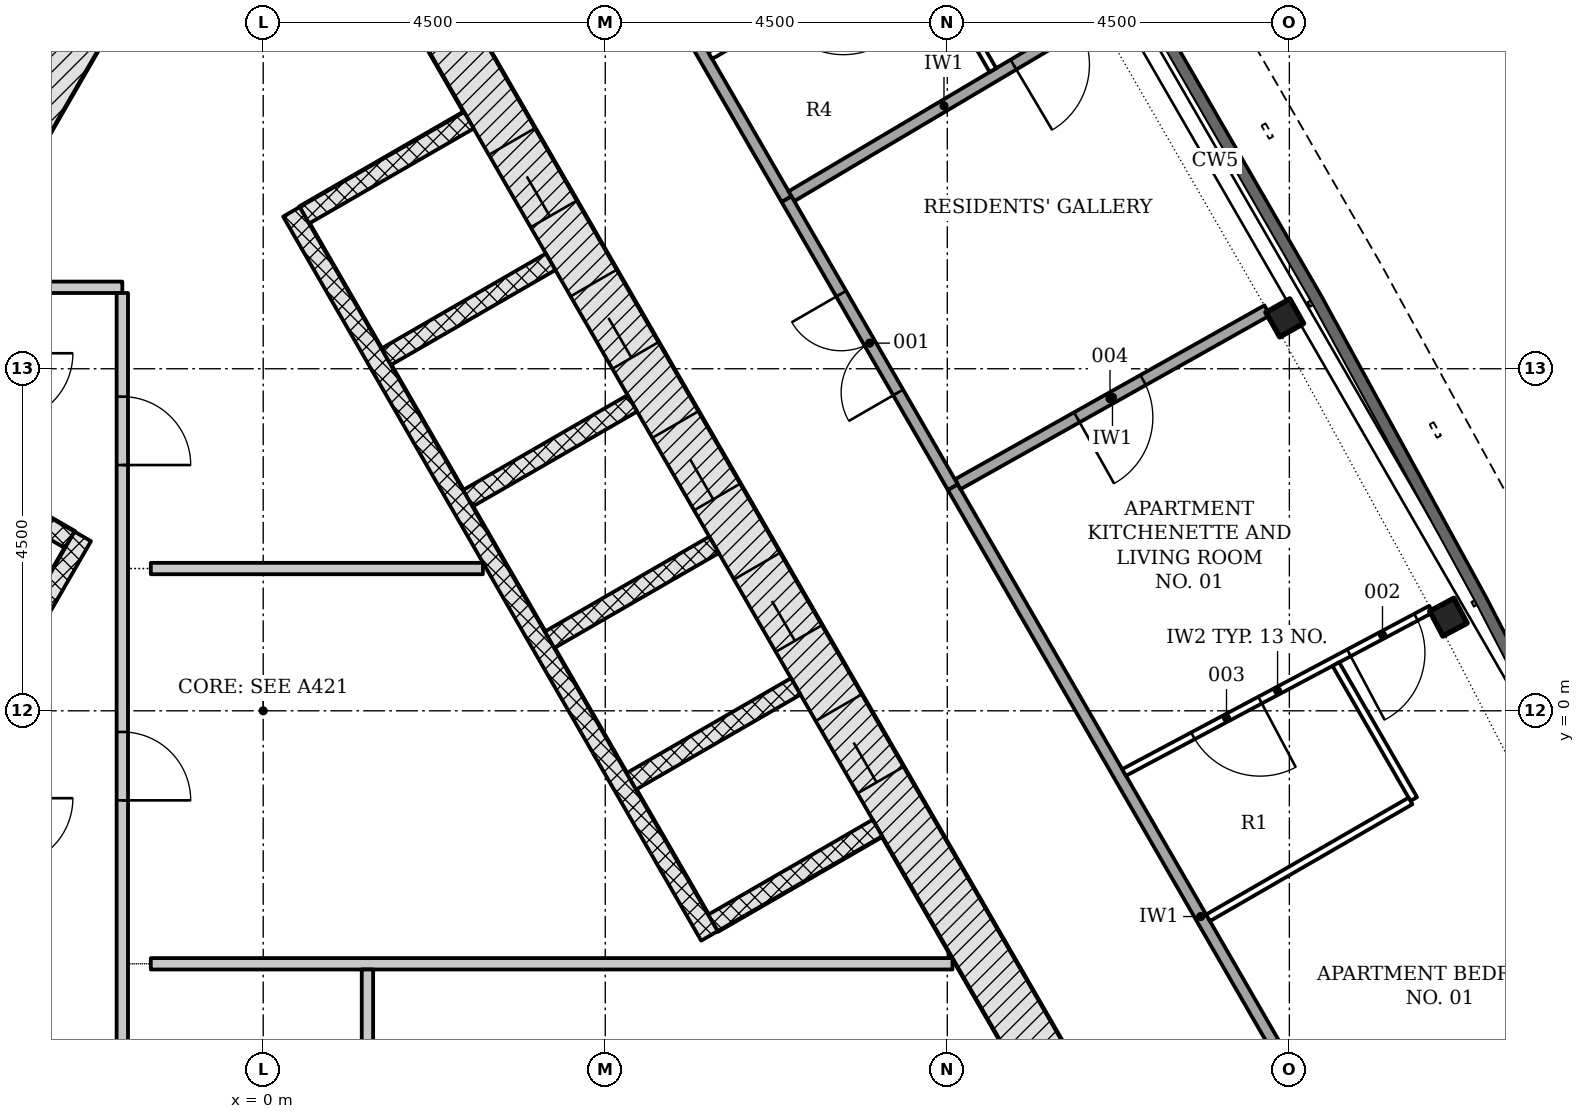
"""IFC4 building model, lengths in metres.
Left out: names, types, materials, properties, quantities, classifications, styles, units other than length and angle.
Written with IfcOpenShell. Run it as: python <this file> out.ifc"""

import sys

from ifc_helpers import new_model, si_unit, direction, frame, frame_2d, origin, origin_2d, place, context, subcontext, project, spatial, polyline, rectangle, i_section, outline, extrude, element, fill, save


model = new_model("IFC4")
c1 = context("Model", 3, precision=1e-05, world=origin(), true_north=direction((0.0, 1.0)))
c2 = subcontext(c1, "Body", "Model", "MODEL_VIEW")
j1 = project(units=[si_unit("LENGTHUNIT", "METRE"), si_unit("PLANEANGLEUNIT", "RADIAN")], contexts=[c1])
p1 = place(None, origin())
s1 = spatial("IfcSite", under=j1, at=p1, CompositionType="ELEMENT")
p2 = place(p1, origin())
s2 = spatial("IfcBuilding", under=s1, at=p2, CompositionType="ELEMENT")
p3 = place(p2, frame((0.0, 0.0, 263.4)))
s3 = spatial("IfcBuildingStorey", under=s2, at=p3, CompositionType="ELEMENT", Elevation=263.4)
p4 = place(p3, frame((8.926, -6.753, -0.2), z_axis=(0.0, 0.0, 1.0), x_axis=(0.500042739161, 0.866000726912, 0.0)))
e1 = element("IfcWall", 1, at=p4, inside=s3, PredefinedType="SHEAR", context=c2, shape_type="SweptSolid", body=[
    extrude(rectangle(XDim=2.771, YDim=0.7, at=frame_2d((1.386, 0.0))), origin(), (0.0, 0.0, 1.0), 3.6),
])
p5 = place(p3, frame((10.311, -4.703, -0.2), z_axis=(0.0, 0.0, 1.0), x_axis=(-0.500001446645, 0.866024568562, 0.0)))
e2 = element("IfcWall", 2, at=p5, inside=s3, PredefinedType="SHEAR", context=c2, shape_type="SweptSolid", body=[
    extrude(rectangle(XDim=18.458, YDim=0.7, at=frame_2d((9.229, 0.0))), origin(), (0.0, 0.0, 1.0), 3.6),
])
p6 = place(p5, frame((4.379, 0.0, 0.2)))
e3 = element("IfcOpeningElement", 3, at=p6, cuts=e2, PredefinedType="OPENING", context=c2, shape_type="SweptSolid", body=[
    extrude(rectangle(XDim=1.1, YDim=2.1, at=frame_2d((0.55, 1.05))), frame((0.0, 0.36, 0.0), z_axis=(0.0, -1.0, 0.0), x_axis=(1.0, 0.0, 0.0)), (0.0, 0.0, 1.0), 0.72),
])
p7 = place(p5, frame((6.529, 0.0, 0.2)))
e4 = element("IfcOpeningElement", 4, at=p7, cuts=e2, PredefinedType="OPENING", context=c2, shape_type="SweptSolid", body=[
    extrude(rectangle(XDim=1.1, YDim=2.1, at=frame_2d((0.55, 1.05))), frame((0.0, 0.36, 0.0), z_axis=(0.0, -1.0, 0.0), x_axis=(1.0, 0.0, 0.0)), (0.0, 0.0, 1.0), 0.72),
])
p8 = place(p5, frame((8.679, 0.0, 0.2)))
e5 = element("IfcOpeningElement", 5, at=p8, cuts=e2, PredefinedType="OPENING", context=c2, shape_type="SweptSolid", body=[
    extrude(rectangle(XDim=1.1, YDim=2.1, at=frame_2d((0.55, 1.05))), frame((0.0, 0.36, 0.0), z_axis=(0.0, -1.0, 0.0), x_axis=(1.0, 0.0, 0.0)), (0.0, 0.0, 1.0), 0.72),
])
p9 = place(p5, frame((10.829, 0.0, 0.2)))
e6 = element("IfcOpeningElement", 6, at=p9, cuts=e2, PredefinedType="OPENING", context=c2, shape_type="SweptSolid", body=[
    extrude(rectangle(XDim=1.1, YDim=2.1, at=frame_2d((0.55, 1.05))), frame((0.0, 0.36, 0.0), z_axis=(0.0, -1.0, 0.0), x_axis=(1.0, 0.0, 0.0)), (0.0, 0.0, 1.0), 0.72),
])
p10 = place(p5, frame((12.979, 0.0, 0.2)))
e7 = element("IfcOpeningElement", 7, at=p10, cuts=e2, PredefinedType="OPENING", context=c2, shape_type="SweptSolid", body=[
    extrude(rectangle(XDim=1.1, YDim=2.1, at=frame_2d((0.55, 1.05))), frame((0.0, 0.36, 0.0), z_axis=(0.0, -1.0, 0.0), x_axis=(1.0, 0.0, 0.0)), (0.0, 0.0, 1.0), 0.72),
])
p11 = place(p3, frame((-1.083, 11.281, -0.2), z_axis=(0.0, 0.0, 1.0), x_axis=(-0.500001446645, -0.866024568562, 0.0)))
e8 = element("IfcWall", 8, at=p11, inside=s3, PredefinedType="SHEAR", context=c2, shape_type="SweptSolid", body=[
    extrude(rectangle(XDim=18.458, YDim=0.7, at=frame_2d((9.229, 0.0))), origin(), (0.0, 0.0, 1.0), 3.6),
])
p12 = place(p11, frame((8.979, 0.0, 0.2)))
e9 = element("IfcOpeningElement", 9, at=p12, cuts=e8, PredefinedType="OPENING", context=c2, shape_type="SweptSolid", body=[
    extrude(rectangle(XDim=1.2, YDim=2.1, at=frame_2d((0.6, 1.05))), frame((0.0, 0.36, 0.0), z_axis=(0.0, -1.0, 0.0), x_axis=(1.0, 0.0, 0.0)), (0.0, 0.0, 1.0), 0.72),
])
p13 = place(p11, frame((11.029, 0.0, 0.2)))
e10 = element("IfcOpeningElement", 10, at=p13, cuts=e8, PredefinedType="OPENING", context=c2, shape_type="SweptSolid", body=[
    extrude(rectangle(XDim=1.2, YDim=2.1, at=frame_2d((0.6, 1.05))), frame((0.0, 0.36, 0.0), z_axis=(0.0, -1.0, 0.0), x_axis=(1.0, 0.0, 0.0)), (0.0, 0.0, 1.0), 0.72),
])
for number, where, z_axis, x_axis in (
    (11, (15.593, 1.232, -0.2), (0.0, 0.0, 1.0), (-0.47, 0.883, 0.0)),
    (12, (13.44, 5.169, -0.2), (0.0, 0.0, 1.0), (-0.49, 0.872, 0.0)),
):
    element("IfcColumn", number, at=place(p3, frame(where, z_axis=z_axis, x_axis=x_axis)), inside=s3, PredefinedType="COLUMN", context=c2, shape_type="SweptSolid", body=[
        extrude(i_section(OverallWidth=0.371, OverallDepth=0.361, WebThickness=0.012, FlangeThickness=0.02, FilletRadius=0.015, at=origin_2d()), origin(), (0.0, 0.0, 1.0), 3.6),
    ])
p14 = place(p3, origin())
e13 = element("IfcWall", 13, at=p14, inside=s3, PredefinedType="NOTDEFINED", context=c2, shape_type="SweptSolid", body=[
    extrude(outline(polyline([(11.244, -14.46), (13.211, -14.336), (14.708, -14.069), (16.111, -13.485), (17.355, -12.611), (18.381, -11.49), (19.141, -10.174), (19.599, -8.724), (19.733, -7.21), (19.538, -5.703), (19.021, -4.273), (18.145, -2.507), (17.876, -2.64), (18.745, -4.391), (19.244, -5.774), (19.432, -7.216), (19.303, -8.665), (18.865, -10.052), (18.138, -11.312), (17.156, -12.385), (15.965, -13.22), (14.623, -13.779), (13.176, -14.038), (11.225, -14.161), (11.244, -14.46)])), origin(), (0.0, 0.0, 1.0), 3.3),
])
for number, where, z_axis, x_axis in (
    (14, (8.081, -1.541, -0.2), (0.0, 0.0, 1.0), (-0.866, -0.5, 0.0)),
    (15, (7.006, 0.321, -0.2), (0.0, 0.0, 1.0), (-0.866, -0.5, 0.0)),
):
    element("IfcWall", number, at=place(p3, frame(where, z_axis=z_axis, x_axis=x_axis)), inside=s3, PredefinedType="PARTITIONING", context=c2, shape_type="SweptSolid", body=[
        extrude(rectangle(XDim=2.5, YDim=0.25, at=frame_2d((1.25, 0.0))), origin(), (0.0, 0.0, 1.0), 3.6),
    ])
p15 = place(p3, frame((5.931, 2.183, -0.2), z_axis=(0.0, 0.0, 1.0), x_axis=(-0.866047370643, -0.499961950354, 0.0)))
e16 = element("IfcWall", 16, at=p15, inside=s3, PredefinedType="PARTITIONING", context=c2, shape_type="SweptSolid", body=[
    extrude(rectangle(XDim=2.5, YDim=0.25, at=frame_2d((1.25, 0.0))), origin(), (0.0, 0.0, 1.0), 3.6),
])
for number, where, z_axis, x_axis in (
    (17, (4.856, 4.045, -0.2), (0.0, 0.0, 1.0), (-0.866, -0.5, 0.0)),
    (18, (3.781, 5.907, -0.2), (0.0, 0.0, 1.0), (-0.866, -0.5, 0.0)),
    (19, (2.706, 7.769, -0.2), (0.0, 0.0, 1.0), (-0.866, -0.5, 0.0)),
):
    element("IfcWall", number, at=place(p3, frame(where, z_axis=z_axis, x_axis=x_axis)), inside=s3, PredefinedType="PARTITIONING", context=c2, shape_type="SweptSolid", body=[
        extrude(rectangle(XDim=2.5, YDim=0.25, at=frame_2d((1.25, 0.0))), origin(), (0.0, 0.0, 1.0), 3.6),
    ])
p16 = place(p3, frame((5.87, -2.961, 0.0), z_axis=(0.0, 0.0, 1.0), x_axis=(-0.50000615651, 0.866021849293, 0.0)))
e20 = element("IfcWall", 20, at=p16, inside=s3, PredefinedType="PARTITIONING", context=c2, shape_type="SweptSolid", body=[
    extrude(rectangle(XDim=11.0, YDim=0.25, at=frame_2d((5.5, 0.0))), origin(), (0.0, 0.0, 1.0), 3.4),
])
p17 = place(p3, frame((-5.056, 3.699, -0.2), z_axis=(0.0, 0.0, 1.0), x_axis=(0.866032775405, -0.499987231761, 0.0)))
e21 = element("IfcWall", 21, at=p17, inside=s3, PredefinedType="PARTITIONING", context=c2, shape_type="SweptSolid", body=[
    extrude(rectangle(XDim=2.9, YDim=0.25, at=frame_2d((1.45, 0.0))), origin(), (0.0, 0.0, 1.0), 3.6),
])
p18 = place(p3, frame((-2.374, 2.294, 0.0), z_axis=(0.0, 0.0, 1.0), x_axis=(-0.500003174267, -0.866023571113, 0.0)))
e22 = element("IfcWall", 22, at=p18, inside=s3, PredefinedType="PARTITIONING", context=c2, shape_type="SweptSolid", body=[
    extrude(rectangle(XDim=6.7, YDim=0.25, at=frame_2d((3.35, 0.0))), origin(), (0.0, 0.0, 1.0), 3.4),
])
p19 = place(p3, frame((-3.329, 5.572, 0.0), z_axis=(0.0, 0.0, 1.0), x_axis=(1.0, 0.0, 0.0)))
e23 = element("IfcWall", 23, at=p19, inside=s3, PredefinedType="PARTITIONING", context=c2, shape_type="SweptSolid", body=[
    extrude(rectangle(XDim=1.475, YDim=0.15, at=frame_2d((0.737, 0.0))), origin(), (0.0, 0.0, 1.0), 3.4),
])
p20 = place(p3, frame((-1.854, 5.497, 0.0), z_axis=(0.0, 0.0, 1.0), x_axis=(0.0, -1.0, 0.0)))
e24 = element("IfcWall", 24, at=p20, inside=s3, PredefinedType="PARTITIONING", context=c2, shape_type="SweptSolid", body=[
    extrude(rectangle(XDim=11.725, YDim=0.15, at=frame_2d((5.863, 0.0))), origin(), (0.0, 0.0, 1.0), 3.4),
])
p21 = place(p20, frame((5.775, 0.0, 0.0)))
e25 = element("IfcOpeningElement", 25, at=p21, cuts=e24, PredefinedType="OPENING", context=c2, shape_type="SweptSolid", body=[
    extrude(rectangle(XDim=0.9, YDim=2.1, at=frame_2d((0.45, 1.05))), frame((0.0, 0.085, 0.0), z_axis=(0.0, -1.0, 0.0), x_axis=(1.0, 0.0, 0.0)), (0.0, 0.0, 1.0), 0.17),
])
p22 = place(p20, frame((1.364, 0.0, 0.0)))
e26 = element("IfcOpeningElement", 26, at=p22, cuts=e24, PredefinedType="OPENING", context=c2, shape_type="SweptSolid", body=[
    extrude(rectangle(XDim=0.9, YDim=2.1, at=frame_2d((0.45, 1.05))), frame((0.0, 0.085, 0.0), z_axis=(0.0, -1.0, 0.0), x_axis=(1.0, 0.0, 0.0)), (0.0, 0.0, 1.0), 0.17),
])
p23 = place(p3, frame((-1.479, -3.328, 0.0), z_axis=(0.0, 0.0, 1.0), x_axis=(1.0, 0.0, 0.0)))
e27 = element("IfcWall", 27, at=p23, inside=s3, PredefinedType="PARTITIONING", context=c2, shape_type="SweptSolid", body=[
    extrude(rectangle(XDim=10.547, YDim=0.15, at=frame_2d((5.273, 0.0))), origin(), (0.0, 0.0, 1.0), 3.4),
])
p24 = place(p3, frame((-1.479, 1.872, 0.0), z_axis=(0.0, 0.0, 1.0), x_axis=(1.0, 0.0, 0.0)))
e28 = element("IfcWall", 28, at=p24, inside=s3, PredefinedType="PARTITIONING", context=c2, shape_type="SweptSolid", body=[
    extrude(rectangle(XDim=4.369, YDim=0.15, at=frame_2d((2.185, 0.0))), origin(), (0.0, 0.0, 1.0), 3.4),
])
p25 = place(p3, frame((1.371, -3.403, 0.0), z_axis=(0.0, 0.0, 1.0), x_axis=(0.0, -1.0, 0.0)))
e29 = element("IfcWall", 29, at=p25, inside=s3, PredefinedType="PARTITIONING", context=c2, shape_type="SweptSolid", body=[
    extrude(rectangle(XDim=2.825, YDim=0.15, at=frame_2d((1.413, 0.0))), origin(), (0.0, 0.0, 1.0), 3.4),
])
p26 = place(p3, frame((15.596, -8.357, 0.0), z_axis=(0.0, 0.0, 1.0), x_axis=(-0.500010741103, 0.866019202317, 0.0)))
e30 = element("IfcWall", 30, at=p26, inside=s3, PredefinedType="PARTITIONING", context=c2, shape_type="SweptSolid", body=[
    extrude(rectangle(XDim=13.049, YDim=0.15, at=frame_2d((6.524, 0.0))), origin(), (0.0, 0.0, 1.0), 2.852),
])
p27 = place(p3, frame((6.885, 6.731, 0.0), z_axis=(0.0, 0.0, 1.0), x_axis=(-0.500003399299, 0.866023441189, 0.0)))
e31 = element("IfcWall", 31, at=p27, inside=s3, PredefinedType="PARTITIONING", context=c2, shape_type="SweptSolid", body=[
    extrude(rectangle(XDim=5.341, YDim=0.15, at=frame_2d((2.67, 0.0))), origin(), (0.0, 0.0, 1.0), 2.852),
])
p28 = place(p3, frame((13.209, 5.269, 0.0), z_axis=(0.0, 0.0, 1.0), x_axis=(-0.871762529681, -0.489928659953, 0.0)))
e32 = element("IfcWall", 32, at=p28, inside=s3, PredefinedType="PARTITIONING", context=c2, shape_type="SweptSolid", body=[
    extrude(rectangle(XDim=4.671, YDim=0.15, at=frame_2d((2.335, 0.0))), origin(), (0.0, 0.0, 1.0), 3.4),
])
p29 = place(p28, frame((1.873, 0.0, 0.0)))
e33 = element("IfcOpeningElement", 33, at=p29, cuts=e32, PredefinedType="OPENING", context=c2, shape_type="SweptSolid", body=[
    extrude(rectangle(XDim=1.0, YDim=2.1, at=frame_2d((0.5, 1.05))), frame((0.0, 0.085, 0.0), z_axis=(0.0, -1.0, 0.0), x_axis=(1.0, 0.0, 0.0)), (0.0, 0.0, 1.0), 0.17),
])
p30 = place(p3, frame((10.963, 9.149, 0.0), z_axis=(0.0, 0.0, 1.0), x_axis=(-0.860158922337, -0.510026105532, 0.0)))
e34 = element("IfcWall", 34, at=p30, inside=s3, PredefinedType="PARTITIONING", context=c2, shape_type="SweptSolid", body=[
    extrude(rectangle(XDim=4.666, YDim=0.15, at=frame_2d((2.333, 0.0))), origin(), (0.0, 0.0, 1.0), 3.4),
])
p31 = place(p30, frame((0.27, 0.0, 0.0)))
e35 = element("IfcOpeningElement", 35, at=p31, cuts=e34, PredefinedType="OPENING", context=c2, shape_type="SweptSolid", body=[
    extrude(rectangle(XDim=1.0, YDim=2.1, at=frame_2d((0.5, 1.05))), frame((0.0, 0.085, 0.0), z_axis=(0.0, -1.0, 0.0), x_axis=(1.0, 0.0, 0.0)), (0.0, 0.0, 1.0), 0.17),
])
p32 = place(p3, frame((9.072, 2.944, 0.0), z_axis=(0.0, 0.0, 1.0), x_axis=(-0.499999494409, 0.866025695687, 0.0)))
e36 = element("IfcWall", 36, at=p32, inside=s3, PredefinedType="PARTITIONING", context=c2, shape_type="SweptSolid", body=[
    extrude(rectangle(XDim=4.374, YDim=0.15, at=frame_2d((2.187, 0.0))), origin(), (0.0, 0.0, 1.0), 2.852),
])
p33 = place(p32, frame((1.437, 0.0, 0.0)))
e37 = element("IfcOpeningElement", 37, at=p33, cuts=e36, PredefinedType="OPENING", context=c2, shape_type="SweptSolid", body=[
    extrude(rectangle(XDim=1.5, YDim=2.1, at=frame_2d((0.75, 1.05))), frame((0.0, 0.085, 0.0), z_axis=(0.0, -1.0, 0.0), x_axis=(1.0, 0.0, 0.0)), (0.0, 0.0, 1.0), 0.17),
])
p34 = place(p3, frame((15.364, 1.337, 0.0), z_axis=(0.0, 0.0, 1.0), x_axis=(-0.882891694615, -0.469576676997, 0.0)))
e38 = element("IfcWall", 38, at=p34, inside=s3, PredefinedType="PARTITIONING", context=c2, shape_type="SweptSolid", body=[
    extrude(rectangle(XDim=4.574, YDim=0.1, at=frame_2d((2.287, 0.0))), origin(), (0.0, 0.0, 1.0), 3.4),
])
p35 = place(p34, frame((0.223, 0.0, 0.0)))
e39 = element("IfcOpeningElement", 39, at=p35, cuts=e38, PredefinedType="OPENING", context=c2, shape_type="SweptSolid", body=[
    extrude(rectangle(XDim=1.0, YDim=2.1, at=frame_2d((0.5, 1.05))), frame((0.0, 0.06, 0.0), z_axis=(0.0, -1.0, 0.0), x_axis=(1.0, 0.0, 0.0)), (0.0, 0.0, 1.0), 0.12),
])
p36 = place(p34, frame((2.548, 0.0, 0.0)))
e40 = element("IfcOpeningElement", 40, at=p36, cuts=e38, PredefinedType="OPENING", context=c2, shape_type="SweptSolid", body=[
    extrude(rectangle(XDim=1.0, YDim=2.1, at=frame_2d((0.5, 1.05))), frame((0.0, 0.06, 0.0), z_axis=(0.0, -1.0, 0.0), x_axis=(1.0, 0.0, 0.0)), (0.0, 0.0, 1.0), 0.12),
])
p37 = place(p3, frame((14.112, 0.614, 0.0), z_axis=(0.0, 0.0, 1.0), x_axis=(0.500007699544, -0.866020958405, 0.0)))
e41 = element("IfcWall", 41, at=p37, inside=s3, PredefinedType="PARTITIONING", context=c2, shape_type="SweptSolid", body=[
    extrude(rectangle(XDim=2.05, YDim=0.1, at=frame_2d((1.025, 0.0))), origin(), (0.0, 0.0, 1.0), 2.852),
])
p38 = place(p3, frame((15.094, -1.186, 0.0), z_axis=(0.0, 0.0, 1.0), x_axis=(-0.866050731258, -0.499956128963, 0.0)))
e42 = element("IfcWall", 42, at=p38, inside=s3, PredefinedType="PARTITIONING", context=c2, shape_type="SweptSolid", body=[
    extrude(rectangle(XDim=3.075, YDim=0.1, at=frame_2d((1.538, 0.0))), origin(), (0.0, 0.0, 1.0), 3.4),
])
p39 = place(p3, frame((9.6, 8.428, 0.0), z_axis=(0.0, 0.0, 1.0), x_axis=(-0.499990325971, 0.866030989016, 0.0)))
e43 = element("IfcWall", 43, at=p39, inside=s3, PredefinedType="PARTITIONING", context=c2, shape_type="SweptSolid", body=[
    extrude(rectangle(XDim=2.025, YDim=0.1, at=frame_2d((1.012, 0.0))), origin(), (0.0, 0.0, 1.0), 3.4),
])
p40 = place(p3, frame((8.544, 10.157, 0.0), z_axis=(0.0, 0.0, 1.0), x_axis=(-0.866016353143, -0.500015675843, 0.0)))
e44 = element("IfcWall", 44, at=p40, inside=s3, PredefinedType="PARTITIONING", context=c2, shape_type="SweptSolid", body=[
    extrude(rectangle(XDim=3.075, YDim=0.1, at=frame_2d((1.538, 0.0))), origin(), (0.0, 0.0, 1.0), 3.4),
])
p41 = place(p40, frame((1.05, 0.0, 0.0)))
e45 = element("IfcOpeningElement", 45, at=p41, cuts=e44, PredefinedType="OPENING", context=c2, shape_type="SweptSolid", body=[
    extrude(rectangle(XDim=1.0, YDim=2.1, at=frame_2d((0.5, 1.05))), frame((0.0, 0.06, 0.0), z_axis=(0.0, -1.0, 0.0), x_axis=(1.0, 0.0, 0.0)), (0.0, 0.0, 1.0), 0.12),
])
p42 = place(p6, origin())
e46 = element("IfcDoor", 46, at=p42, inside=s3, OperationType="DOUBLE_DOOR_SLIDING", PredefinedType="DOOR", context=c2, shape_type="SweptSolid", body=[
    extrude(rectangle(XDim=1.1, YDim=2.1, at=frame_2d((0.55, 1.05))), frame((0.0, 0.025, 0.0), z_axis=(0.0, -1.0, 0.0), x_axis=(1.0, 0.0, 0.0)), (0.0, 0.0, 1.0), 0.05),
])
fill(e3, e46)
p43 = place(p7, origin())
e47 = element("IfcDoor", 47, at=p43, inside=s3, OperationType="DOUBLE_DOOR_SLIDING", PredefinedType="DOOR", context=c2, shape_type="SweptSolid", body=[
    extrude(rectangle(XDim=1.1, YDim=2.1, at=frame_2d((0.55, 1.05))), frame((0.0, 0.025, 0.0), z_axis=(0.0, -1.0, 0.0), x_axis=(1.0, 0.0, 0.0)), (0.0, 0.0, 1.0), 0.05),
])
fill(e4, e47)
p44 = place(p8, origin())
e48 = element("IfcDoor", 48, at=p44, inside=s3, OperationType="DOUBLE_DOOR_SLIDING", PredefinedType="DOOR", context=c2, shape_type="SweptSolid", body=[
    extrude(rectangle(XDim=1.1, YDim=2.1, at=frame_2d((0.55, 1.05))), frame((0.0, 0.025, 0.0), z_axis=(0.0, -1.0, 0.0), x_axis=(1.0, 0.0, 0.0)), (0.0, 0.0, 1.0), 0.05),
])
fill(e5, e48)
p45 = place(p9, origin())
e49 = element("IfcDoor", 49, at=p45, inside=s3, OperationType="DOUBLE_DOOR_SLIDING", PredefinedType="DOOR", context=c2, shape_type="SweptSolid", body=[
    extrude(rectangle(XDim=1.1, YDim=2.1, at=frame_2d((0.55, 1.05))), frame((0.0, 0.025, 0.0), z_axis=(0.0, -1.0, 0.0), x_axis=(1.0, 0.0, 0.0)), (0.0, 0.0, 1.0), 0.05),
])
fill(e6, e49)
p46 = place(p10, origin())
e50 = element("IfcDoor", 50, at=p46, inside=s3, OperationType="DOUBLE_DOOR_SLIDING", PredefinedType="DOOR", context=c2, shape_type="SweptSolid", body=[
    extrude(rectangle(XDim=1.1, YDim=2.1, at=frame_2d((0.55, 1.05))), frame((0.0, 0.025, 0.0), z_axis=(0.0, -1.0, 0.0), x_axis=(1.0, 0.0, 0.0)), (0.0, 0.0, 1.0), 0.05),
])
fill(e7, e50)
p47 = place(p21, origin())
e51 = element("IfcDoor", 51, at=p47, inside=s3, OperationType="SINGLE_SWING_RIGHT", PredefinedType="DOOR", context=c2, shape_type="SweptSolid", body=[
    extrude(rectangle(XDim=0.9, YDim=2.1, at=frame_2d((0.45, 1.05))), frame((0.0, 0.025, 0.0), z_axis=(0.0, -1.0, 0.0), x_axis=(1.0, 0.0, 0.0)), (0.0, 0.0, 1.0), 0.05),
])
fill(e25, e51)
p48 = place(p22, origin())
e52 = element("IfcDoor", 52, at=p48, inside=s3, OperationType="SINGLE_SWING_RIGHT", PredefinedType="DOOR", context=c2, shape_type="SweptSolid", body=[
    extrude(rectangle(XDim=0.9, YDim=2.1, at=frame_2d((0.45, 1.05))), frame((0.0, 0.025, 0.0), z_axis=(0.0, -1.0, 0.0), x_axis=(1.0, 0.0, 0.0)), (0.0, 0.0, 1.0), 0.05),
])
fill(e26, e52)
p49 = place(p33, origin())
e53 = element("IfcDoor", 53, at=p49, inside=s3, OperationType="DOUBLE_DOOR_SINGLE_SWING", PredefinedType="DOOR", context=c2, shape_type="SweptSolid", body=[
    extrude(rectangle(XDim=1.5, YDim=2.1, at=frame_2d((0.75, 1.05))), frame((0.0, 0.025, 0.0), z_axis=(0.0, -1.0, 0.0), x_axis=(1.0, 0.0, 0.0)), (0.0, 0.0, 1.0), 0.05),
])
fill(e37, e53)
p50 = place(p35, origin())
e54 = element("IfcDoor", 54, at=p50, inside=s3, OperationType="SINGLE_SWING_RIGHT", PredefinedType="DOOR", context=c2, shape_type="SweptSolid", body=[
    extrude(rectangle(XDim=1.0, YDim=2.1, at=frame_2d((0.5, 1.05))), frame((0.0, 0.025, 0.0), z_axis=(0.0, -1.0, 0.0), x_axis=(1.0, 0.0, 0.0)), (0.0, 0.0, 1.0), 0.05),
])
fill(e39, e54)
p51 = place(p36, origin())
e55 = element("IfcDoor", 55, at=p51, inside=s3, OperationType="SINGLE_SWING_LEFT", PredefinedType="DOOR", context=c2, shape_type="SweptSolid", body=[
    extrude(rectangle(XDim=1.0, YDim=2.1, at=frame_2d((0.5, 1.05))), frame((0.0, 0.025, 0.0), z_axis=(0.0, -1.0, 0.0), x_axis=(1.0, 0.0, 0.0)), (0.0, 0.0, 1.0), 0.05),
])
fill(e40, e55)
p52 = place(p29, origin())
e56 = element("IfcDoor", 56, at=p52, inside=s3, OperationType="SINGLE_SWING_RIGHT", PredefinedType="DOOR", context=c2, shape_type="SweptSolid", body=[
    extrude(rectangle(XDim=1.0, YDim=2.1, at=frame_2d((0.5, 1.05))), frame((0.0, 0.025, 0.0), z_axis=(0.0, -1.0, 0.0), x_axis=(1.0, 0.0, 0.0)), (0.0, 0.0, 1.0), 0.05),
])
fill(e33, e56)
p53 = place(p31, origin())
e57 = element("IfcDoor", 57, at=p53, inside=s3, OperationType="SINGLE_SWING_RIGHT", PredefinedType="DOOR", context=c2, shape_type="SweptSolid", body=[
    extrude(rectangle(XDim=1.0, YDim=2.1, at=frame_2d((0.5, 1.05))), frame((0.0, 0.025, 0.0), z_axis=(0.0, -1.0, 0.0), x_axis=(1.0, 0.0, 0.0)), (0.0, 0.0, 1.0), 0.05),
])
fill(e35, e57)
save(model, sys.argv[1])
